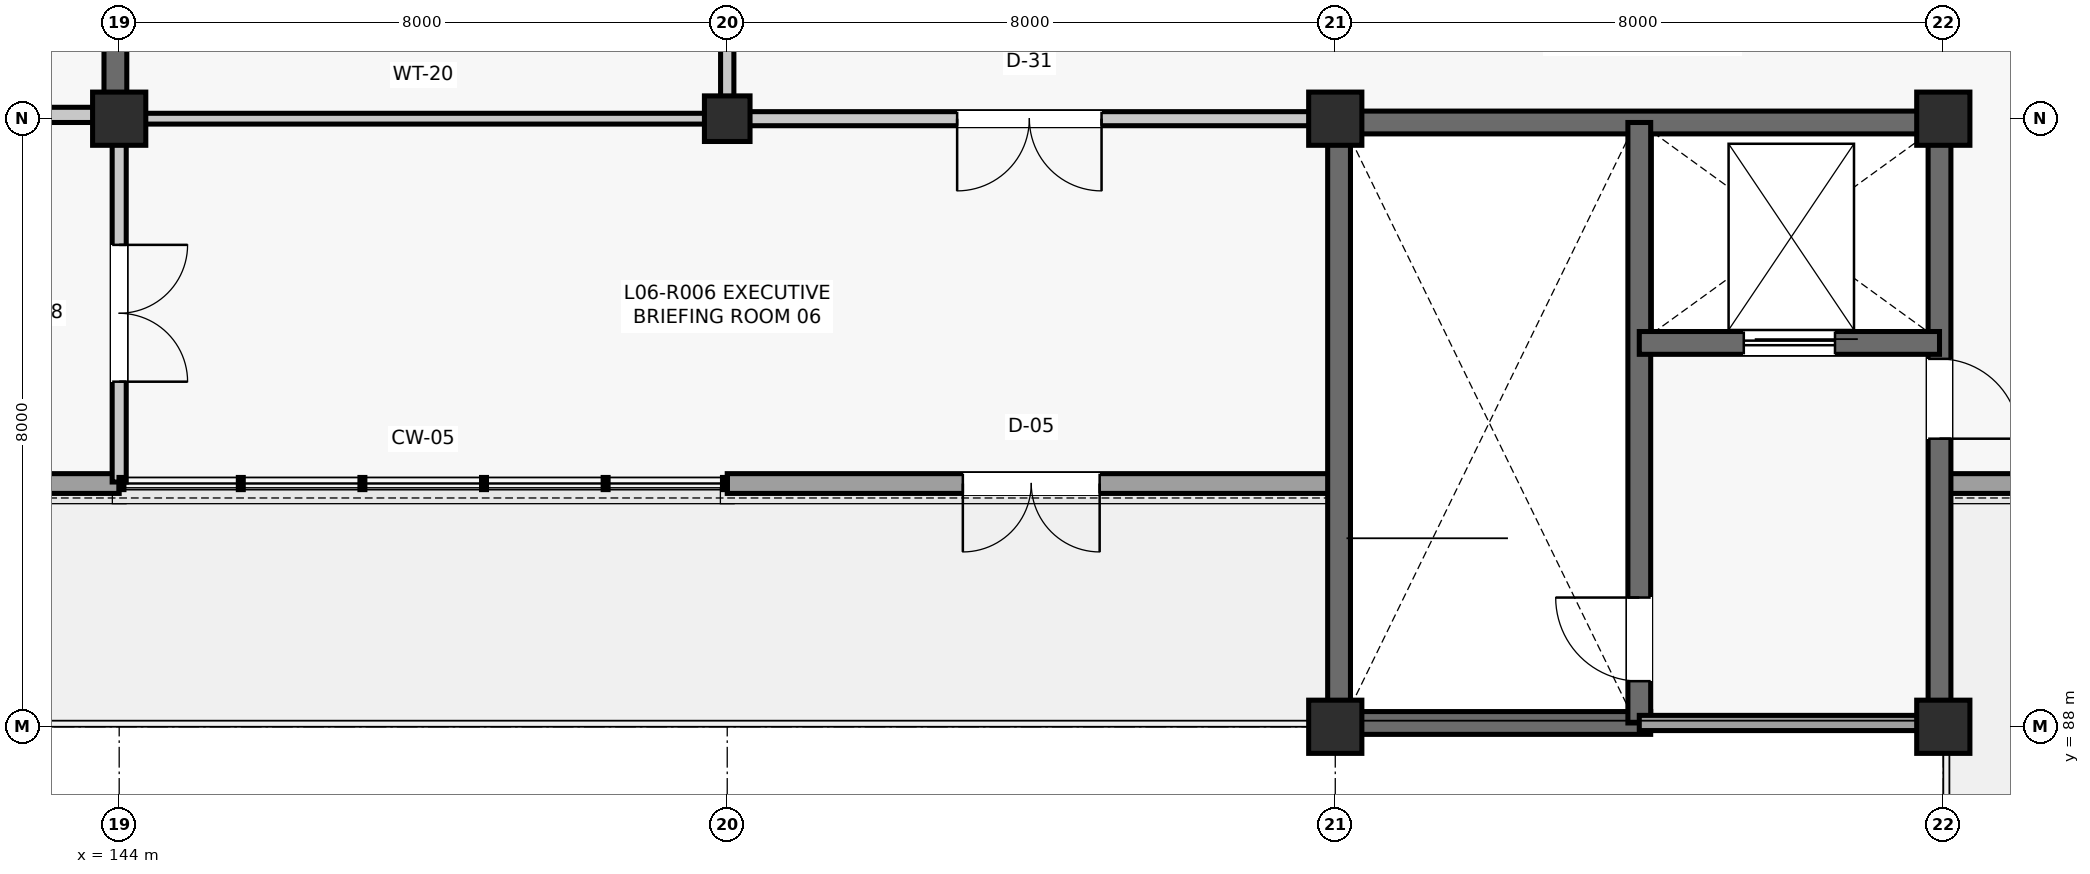
"""IFC4 building model, lengths in metres.
Left out: names, types, materials, properties, quantities, classifications, styles, units other than length and angle.
Written with IfcOpenShell. Run it as: python <this file> out.ifc"""

import sys

from ifc_helpers import new_model, si_unit, direction, frame, frame_2d, origin, origin_2d, place, context, subcontext, project, spatial, rectangle, extrude, element, fill, save


model = new_model("IFC4")
c1 = context("Model", 3, precision=1e-05, world=origin(), true_north=direction((0.0, 1.0)))
c2 = subcontext(c1, "Body", "Model", "MODEL_VIEW")
j1 = project(units=[si_unit("LENGTHUNIT", "METRE"), si_unit("PLANEANGLEUNIT", "RADIAN")], contexts=[c1])
p1 = place(None, origin())
s1 = spatial("IfcSite", under=j1, at=p1, CompositionType="ELEMENT")
p2 = place(p1, origin())
s2 = spatial("IfcBuilding", under=s1, at=p2, CompositionType="ELEMENT")
p3 = place(p2, frame((0.0, 0.0, 25.74)))
s3 = spatial("IfcBuildingStorey", under=s2, at=p3, CompositionType="ELEMENT", Elevation=25.74)
p4 = place(p3, frame((144.0, 96.0, 0.0), z_axis=(0.0, 0.0, 1.0), x_axis=(1.0, 0.0, 0.0)))
e1 = element("IfcColumn", 1, at=p4, inside=s3, PredefinedType="COLUMN", context=c2, shape_type="SweptSolid", body=[
    extrude(rectangle(XDim=0.7, YDim=0.7, at=origin_2d()), origin(), (0.0, 0.0, 1.0), 4.29),
])
p5 = place(p3, frame((152.0, 96.0, 0.0), z_axis=(0.0, 0.0, 1.0), x_axis=(1.0, 0.0, 0.0)))
e2 = element("IfcColumn", 2, at=p5, inside=s3, PredefinedType="COLUMN", context=c2, shape_type="SweptSolid", body=[
    extrude(rectangle(XDim=0.6, YDim=0.6, at=origin_2d()), origin(), (0.0, 0.0, 1.0), 4.29),
])
for number, where, z_axis, x_axis in (
    (3, (160.0, 88.0, 0.0), (0.0, 0.0, 1.0), (1.0, 0.0, 0.0)),
    (4, (160.0, 96.0, 0.0), (0.0, 0.0, 1.0), (1.0, 0.0, 0.0)),
    (5, (168.0, 88.0, 0.0), (0.0, 0.0, 1.0), (1.0, 0.0, 0.0)),
    (6, (168.0, 96.0, 0.0), (0.0, 0.0, 1.0), (1.0, 0.0, 0.0)),
):
    element("IfcColumn", number, at=place(p3, frame(where, z_axis=z_axis, x_axis=x_axis)), inside=s3, PredefinedType="COLUMN", context=c2, shape_type="SweptSolid", body=[
        extrude(rectangle(XDim=0.7, YDim=0.7, at=origin_2d()), origin(), (0.0, 0.0, 1.0), 4.29),
    ])
p6 = place(p3, frame((136.0, 91.2, 0.0), z_axis=(0.0, 0.0, 1.0), x_axis=(1.0, 0.0, 0.0)))
e7 = element("IfcWall", 7, at=p6, inside=s3, PredefinedType="SOLIDWALL", context=c2, shape_type="SweptSolid", body=[
    extrude(rectangle(XDim=8.0, YDim=0.26, at=frame_2d((4.0, 0.0))), origin(), (0.0, 0.0, 1.0), 4.09),
])
p7 = place(p6, frame((2.75, 0.0, 0.85)))
e8 = element("IfcOpeningElement", 8, at=p7, cuts=e7, PredefinedType="OPENING", context=c2, shape_type="SweptSolid", body=[
    extrude(rectangle(XDim=2.5, YDim=2.2, at=frame_2d((1.25, 1.1))), frame((0.0, 0.14, 0.0), z_axis=(0.0, -1.0, 0.0), x_axis=(1.0, 0.0, 0.0)), (0.0, 0.0, 1.0), 0.28),
])
p8 = place(p3, frame((152.0, 91.2, 0.0), z_axis=(0.0, 0.0, 1.0), x_axis=(1.0, 0.0, 0.0)))
e9 = element("IfcWall", 9, at=p8, inside=s3, PredefinedType="SOLIDWALL", context=c2, shape_type="SweptSolid", body=[
    extrude(rectangle(XDim=8.0, YDim=0.26, at=frame_2d((4.0, 0.0))), origin(), (0.0, 0.0, 1.0), 4.09),
])
p9 = place(p8, frame((3.1, 0.0, 0.0)))
e10 = element("IfcOpeningElement", 10, at=p9, cuts=e9, PredefinedType="OPENING", context=c2, shape_type="SweptSolid", body=[
    extrude(rectangle(XDim=1.8, YDim=2.25, at=frame_2d((0.9, 1.125))), frame((0.0, 0.14, 0.0), z_axis=(0.0, -1.0, 0.0), x_axis=(1.0, 0.0, 0.0)), (0.0, 0.0, 1.0), 0.28),
])
p10 = place(p3, frame((168.0, 91.2, 0.0), z_axis=(0.0, 0.0, 1.0), x_axis=(1.0, 0.0, 0.0)))
e11 = element("IfcWall", 11, at=p10, inside=s3, PredefinedType="SOLIDWALL", context=c2, shape_type="SweptSolid", body=[
    extrude(rectangle(XDim=4.8, YDim=0.26, at=frame_2d((2.4, 0.0))), origin(), (0.0, 0.0, 1.0), 4.09),
])
p11 = place(p10, frame((1.45, 0.0, 0.85)))
e12 = element("IfcOpeningElement", 12, at=p11, cuts=e11, PredefinedType="OPENING", context=c2, shape_type="SweptSolid", body=[
    extrude(rectangle(XDim=1.9, YDim=2.2, at=frame_2d((0.95, 1.1))), frame((0.0, 0.14, 0.0), z_axis=(0.0, -1.0, 0.0), x_axis=(1.0, 0.0, 0.0)), (0.0, 0.0, 1.0), 0.28),
])
for number, where, z_axis, x_axis in (
    (13, (160.05, 88.24, 0.0), (0.0, 0.0, 1.0), (0.0, 1.0, 0.0)),
    (14, (160.24, 95.95, 0.0), (0.0, 0.0, 1.0), (1.0, 0.0, 0.0)),
):
    element("IfcWall", number, at=place(p3, frame(where, z_axis=z_axis, x_axis=x_axis)), inside=s3, PredefinedType="SHEAR", context=c2, shape_type="SweptSolid", body=[
        extrude(rectangle(XDim=7.52, YDim=0.3, at=frame_2d((3.76, 0.0))), origin(), (0.0, 0.0, 1.0), 4.09),
    ])
p12 = place(p3, frame((167.95, 88.24, 0.0), z_axis=(0.0, 0.0, 1.0), x_axis=(0.0, 1.0, 0.0)))
e15 = element("IfcWall", 15, at=p12, inside=s3, PredefinedType="SHEAR", context=c2, shape_type="SweptSolid", body=[
    extrude(rectangle(XDim=7.52, YDim=0.3, at=frame_2d((3.76, 0.0))), origin(), (0.0, 0.0, 1.0), 4.09),
])
p13 = place(p12, frame((3.55, 0.0, 0.0)))
e16 = element("IfcOpeningElement", 16, at=p13, cuts=e15, PredefinedType="OPENING", context=c2, shape_type="SweptSolid", body=[
    extrude(rectangle(XDim=1.05, YDim=2.15, at=frame_2d((0.525, 1.075))), frame((0.0, 0.16, 0.0), z_axis=(0.0, -1.0, 0.0), x_axis=(1.0, 0.0, 0.0)), (0.0, 0.0, 1.0), 0.32),
])
p14 = place(p3, frame((160.24, 88.05, 0.0), z_axis=(0.0, 0.0, 1.0), x_axis=(1.0, 0.0, 0.0)))
e17 = element("IfcWall", 17, at=p14, inside=s3, PredefinedType="SHEAR", context=c2, shape_type="SweptSolid", body=[
    extrude(rectangle(XDim=3.91, YDim=0.3, at=frame_2d((1.955, 0.0))), origin(), (0.0, 0.0, 1.0), 4.09),
])
p15 = place(p3, frame((164.0, 88.05, 0.0), z_axis=(0.0, 0.0, 1.0), x_axis=(0.0, 1.0, 0.0)))
e18 = element("IfcWall", 18, at=p15, inside=s3, PredefinedType="SHEAR", context=c2, shape_type="SweptSolid", body=[
    extrude(rectangle(XDim=7.9, YDim=0.3, at=frame_2d((3.95, 0.0))), origin(), (0.0, 0.0, 1.0), 4.09),
])
p16 = place(p15, frame((0.55, 0.0, 0.0)))
e19 = element("IfcOpeningElement", 19, at=p16, cuts=e18, PredefinedType="OPENING", context=c2, shape_type="SweptSolid", body=[
    extrude(rectangle(XDim=1.1, YDim=2.15, at=frame_2d((0.55, 1.075))), frame((0.0, 0.16, 0.0), z_axis=(0.0, -1.0, 0.0), x_axis=(1.0, 0.0, 0.0)), (0.0, 0.0, 1.0), 0.32),
])
p17 = place(p3, frame((164.0, 93.05, 0.0), z_axis=(0.0, 0.0, 1.0), x_axis=(1.0, 0.0, 0.0)))
e20 = element("IfcWall", 20, at=p17, inside=s3, PredefinedType="SHEAR", context=c2, shape_type="SweptSolid", body=[
    extrude(rectangle(XDim=3.95, YDim=0.3, at=frame_2d((1.975, 0.0))), origin(), (0.0, 0.0, 1.0), 4.09),
])
p18 = place(p17, frame((1.375, 0.0, 0.0)))
e21 = element("IfcOpeningElement", 21, at=p18, cuts=e20, PredefinedType="OPENING", context=c2, shape_type="SweptSolid", body=[
    extrude(rectangle(XDim=1.2, YDim=2.2, at=frame_2d((0.6, 1.1))), frame((0.0, 0.16, 0.0), z_axis=(0.0, -1.0, 0.0), x_axis=(1.0, 0.0, 0.0)), (0.0, 0.0, 1.0), 0.32),
])
p19 = place(p3, frame((164.0, 88.05, 0.0), z_axis=(0.0, 0.0, 1.0), x_axis=(1.0, 0.0, 0.0)))
e22 = element("IfcWall", 22, at=p19, inside=s3, PredefinedType="PARTITIONING", context=c2, shape_type="SweptSolid", body=[
    extrude(rectangle(XDim=3.66, YDim=0.2, at=frame_2d((1.83, 0.0))), origin(), (0.0, 0.0, 1.0), 3.408),
])
p20 = place(p3, frame((143.95, 96.24, 0.0), z_axis=(0.0, 0.0, 1.0), x_axis=(0.0, 1.0, 0.0)))
e23 = element("IfcWall", 23, at=p20, inside=s3, PredefinedType="SHEAR", context=c2, shape_type="SweptSolid", body=[
    extrude(rectangle(XDim=7.52, YDim=0.3, at=frame_2d((3.76, 0.0))), origin(), (0.0, 0.0, 1.0), 4.09),
])
p21 = place(p3, frame((140.0, 96.05, 0.0), z_axis=(0.0, 0.0, 1.0), x_axis=(1.0, 0.0, 0.0)))
e24 = element("IfcWall", 24, at=p21, inside=s3, PredefinedType="PARTITIONING", context=c2, shape_type="SweptSolid", body=[
    extrude(rectangle(XDim=3.66, YDim=0.2, at=frame_2d((1.83, 0.0))), origin(), (0.0, 0.0, 1.0), 3.408),
])
p22 = place(p21, frame((1.23, 0.0, 0.0)))
e25 = element("IfcOpeningElement", 25, at=p22, cuts=e24, PredefinedType="OPENING", context=c2, shape_type="SweptSolid", body=[
    extrude(rectangle(XDim=1.2, YDim=2.15, at=frame_2d((0.6, 1.075))), frame((0.0, 0.11, 0.0), z_axis=(0.0, -1.0, 0.0), x_axis=(1.0, 0.0, 0.0)), (0.0, 0.0, 1.0), 0.22),
])
p23 = place(p3, frame((144.0, 91.22, 0.0), z_axis=(0.0, 0.0, 1.0), x_axis=(0.0, 1.0, 0.0)))
e26 = element("IfcWall", 26, at=p23, inside=s3, PredefinedType="PARTITIONING", context=c2, shape_type="SweptSolid", body=[
    extrude(rectangle(XDim=4.44, YDim=0.185, at=frame_2d((2.22, 0.0))), origin(), (0.0, 0.0, 1.0), 3.408),
])
p24 = place(p23, frame((1.32, 0.0, 0.0)))
e27 = element("IfcOpeningElement", 27, at=p24, cuts=e26, PredefinedType="OPENING", context=c2, shape_type="SweptSolid", body=[
    extrude(rectangle(XDim=1.8, YDim=2.35, at=frame_2d((0.9, 1.175))), frame((0.0, 0.103, 0.0), z_axis=(0.0, -1.0, 0.0), x_axis=(1.0, 0.0, 0.0)), (0.0, 0.0, 1.0), 0.205),
])
p25 = place(p3, frame((144.34, 96.0, 0.0), z_axis=(0.0, 0.0, 1.0), x_axis=(1.0, 0.0, 0.0)))
e28 = element("IfcWall", 28, at=p25, inside=s3, PredefinedType="PARTITIONING", context=c2, shape_type="SweptSolid", body=[
    extrude(rectangle(XDim=7.37, YDim=0.142, at=frame_2d((3.685, 0.0))), origin(), (0.0, 0.0, 1.0), 3.408),
])
p26 = place(p3, frame((152.0, 96.29, 0.0), z_axis=(0.0, 0.0, 1.0), x_axis=(0.0, 1.0, 0.0)))
e29 = element("IfcWall", 29, at=p26, inside=s3, PredefinedType="PARTITIONING", context=c2, shape_type="SweptSolid", body=[
    extrude(rectangle(XDim=7.42, YDim=0.175, at=frame_2d((3.71, 0.0))), origin(), (0.0, 0.0, 1.0), 3.408),
])
p27 = place(p26, frame((3.17, 0.0, 0.0)))
e30 = element("IfcOpeningElement", 30, at=p27, cuts=e29, PredefinedType="OPENING", context=c2, shape_type="SweptSolid", body=[
    extrude(rectangle(XDim=1.08, YDim=2.2, at=frame_2d((0.54, 1.1))), frame((0.0, 0.097, 0.0), z_axis=(0.0, -1.0, 0.0), x_axis=(1.0, 0.0, 0.0)), (0.0, 0.0, 1.0), 0.195),
])
p28 = place(p3, frame((152.29, 96.0, 0.0), z_axis=(0.0, 0.0, 1.0), x_axis=(1.0, 0.0, 0.0)))
e31 = element("IfcWall", 31, at=p28, inside=s3, PredefinedType="PARTITIONING", context=c2, shape_type="SweptSolid", body=[
    extrude(rectangle(XDim=7.37, YDim=0.185, at=frame_2d((3.685, 0.0))), origin(), (0.0, 0.0, 1.0), 3.408),
])
p29 = place(p28, frame((2.735, 0.0, 0.0)))
e32 = element("IfcOpeningElement", 32, at=p29, cuts=e31, PredefinedType="OPENING", context=c2, shape_type="SweptSolid", body=[
    extrude(rectangle(XDim=1.9, YDim=2.38, at=frame_2d((0.95, 1.19))), frame((0.0, 0.103, 0.0), z_axis=(0.0, -1.0, 0.0), x_axis=(1.0, 0.0, 0.0)), (0.0, 0.0, 1.0), 0.205),
])
p30 = place(p9, frame((1.8, 0.0, 0.0), z_axis=(0.0, 0.0, 1.0), x_axis=(-1.0, 0.0, 0.0)))
e33 = element("IfcDoor", 33, at=p30, inside=s3, OperationType="DOUBLE_DOOR_SINGLE_SWING", PredefinedType="DOOR", context=c2, shape_type="SweptSolid", body=[
    extrude(rectangle(XDim=1.8, YDim=2.25, at=frame_2d((0.9, 1.125))), frame((0.0, 0.025, 0.0), z_axis=(0.0, -1.0, 0.0), x_axis=(1.0, 0.0, 0.0)), (0.0, 0.0, 1.0), 0.05),
])
fill(e10, e33)
p31 = place(p16, origin())
e34 = element("IfcDoor", 34, at=p31, inside=s3, OperationType="SINGLE_SWING_RIGHT", PredefinedType="DOOR", context=c2, shape_type="SweptSolid", body=[
    extrude(rectangle(XDim=1.1, YDim=2.15, at=frame_2d((0.55, 1.075))), frame((0.0, 0.025, 0.0), z_axis=(0.0, -1.0, 0.0), x_axis=(1.0, 0.0, 0.0)), (0.0, 0.0, 1.0), 0.05),
])
fill(e19, e34)
p32 = place(p18, origin())
e35 = element("IfcDoor", 35, at=p32, inside=s3, OperationType="SLIDING_TO_LEFT", PredefinedType="DOOR", context=c2, shape_type="SweptSolid", body=[
    extrude(rectangle(XDim=1.2, YDim=2.2, at=frame_2d((0.6, 1.1))), frame((0.0, 0.025, 0.0), z_axis=(0.0, -1.0, 0.0), x_axis=(1.0, 0.0, 0.0)), (0.0, 0.0, 1.0), 0.05),
])
fill(e21, e35)
p33 = place(p13, frame((1.05, 0.0, 0.0), z_axis=(0.0, 0.0, 1.0), x_axis=(-1.0, 0.0, 0.0)))
e36 = element("IfcDoor", 36, at=p33, inside=s3, OperationType="SINGLE_SWING_LEFT", PredefinedType="DOOR", context=c2, shape_type="SweptSolid", body=[
    extrude(rectangle(XDim=1.05, YDim=2.15, at=frame_2d((0.525, 1.075))), frame((0.0, 0.025, 0.0), z_axis=(0.0, -1.0, 0.0), x_axis=(1.0, 0.0, 0.0)), (0.0, 0.0, 1.0), 0.05),
])
fill(e16, e36)
p34 = place(p24, frame((1.8, 0.0, 0.0), z_axis=(0.0, 0.0, 1.0), x_axis=(-1.0, 0.0, 0.0)))
e37 = element("IfcDoor", 37, at=p34, inside=s3, OperationType="DOUBLE_DOOR_SINGLE_SWING", PredefinedType="DOOR", context=c2, shape_type="SweptSolid", body=[
    extrude(rectangle(XDim=1.8, YDim=2.35, at=frame_2d((0.9, 1.175))), frame((0.0, 0.025, 0.0), z_axis=(0.0, -1.0, 0.0), x_axis=(1.0, 0.0, 0.0)), (0.0, 0.0, 1.0), 0.05),
])
fill(e27, e37)
p35 = place(p29, frame((1.9, 0.0, 0.0), z_axis=(0.0, 0.0, 1.0), x_axis=(-1.0, 0.0, 0.0)))
e38 = element("IfcDoor", 38, at=p35, inside=s3, OperationType="DOUBLE_DOOR_SINGLE_SWING", PredefinedType="DOOR", context=c2, shape_type="SweptSolid", body=[
    extrude(rectangle(XDim=1.9, YDim=2.38, at=frame_2d((0.95, 1.19))), frame((0.0, 0.025, 0.0), z_axis=(0.0, -1.0, 0.0), x_axis=(1.0, 0.0, 0.0)), (0.0, 0.0, 1.0), 0.05),
])
fill(e32, e38)
save(model, sys.argv[1])
